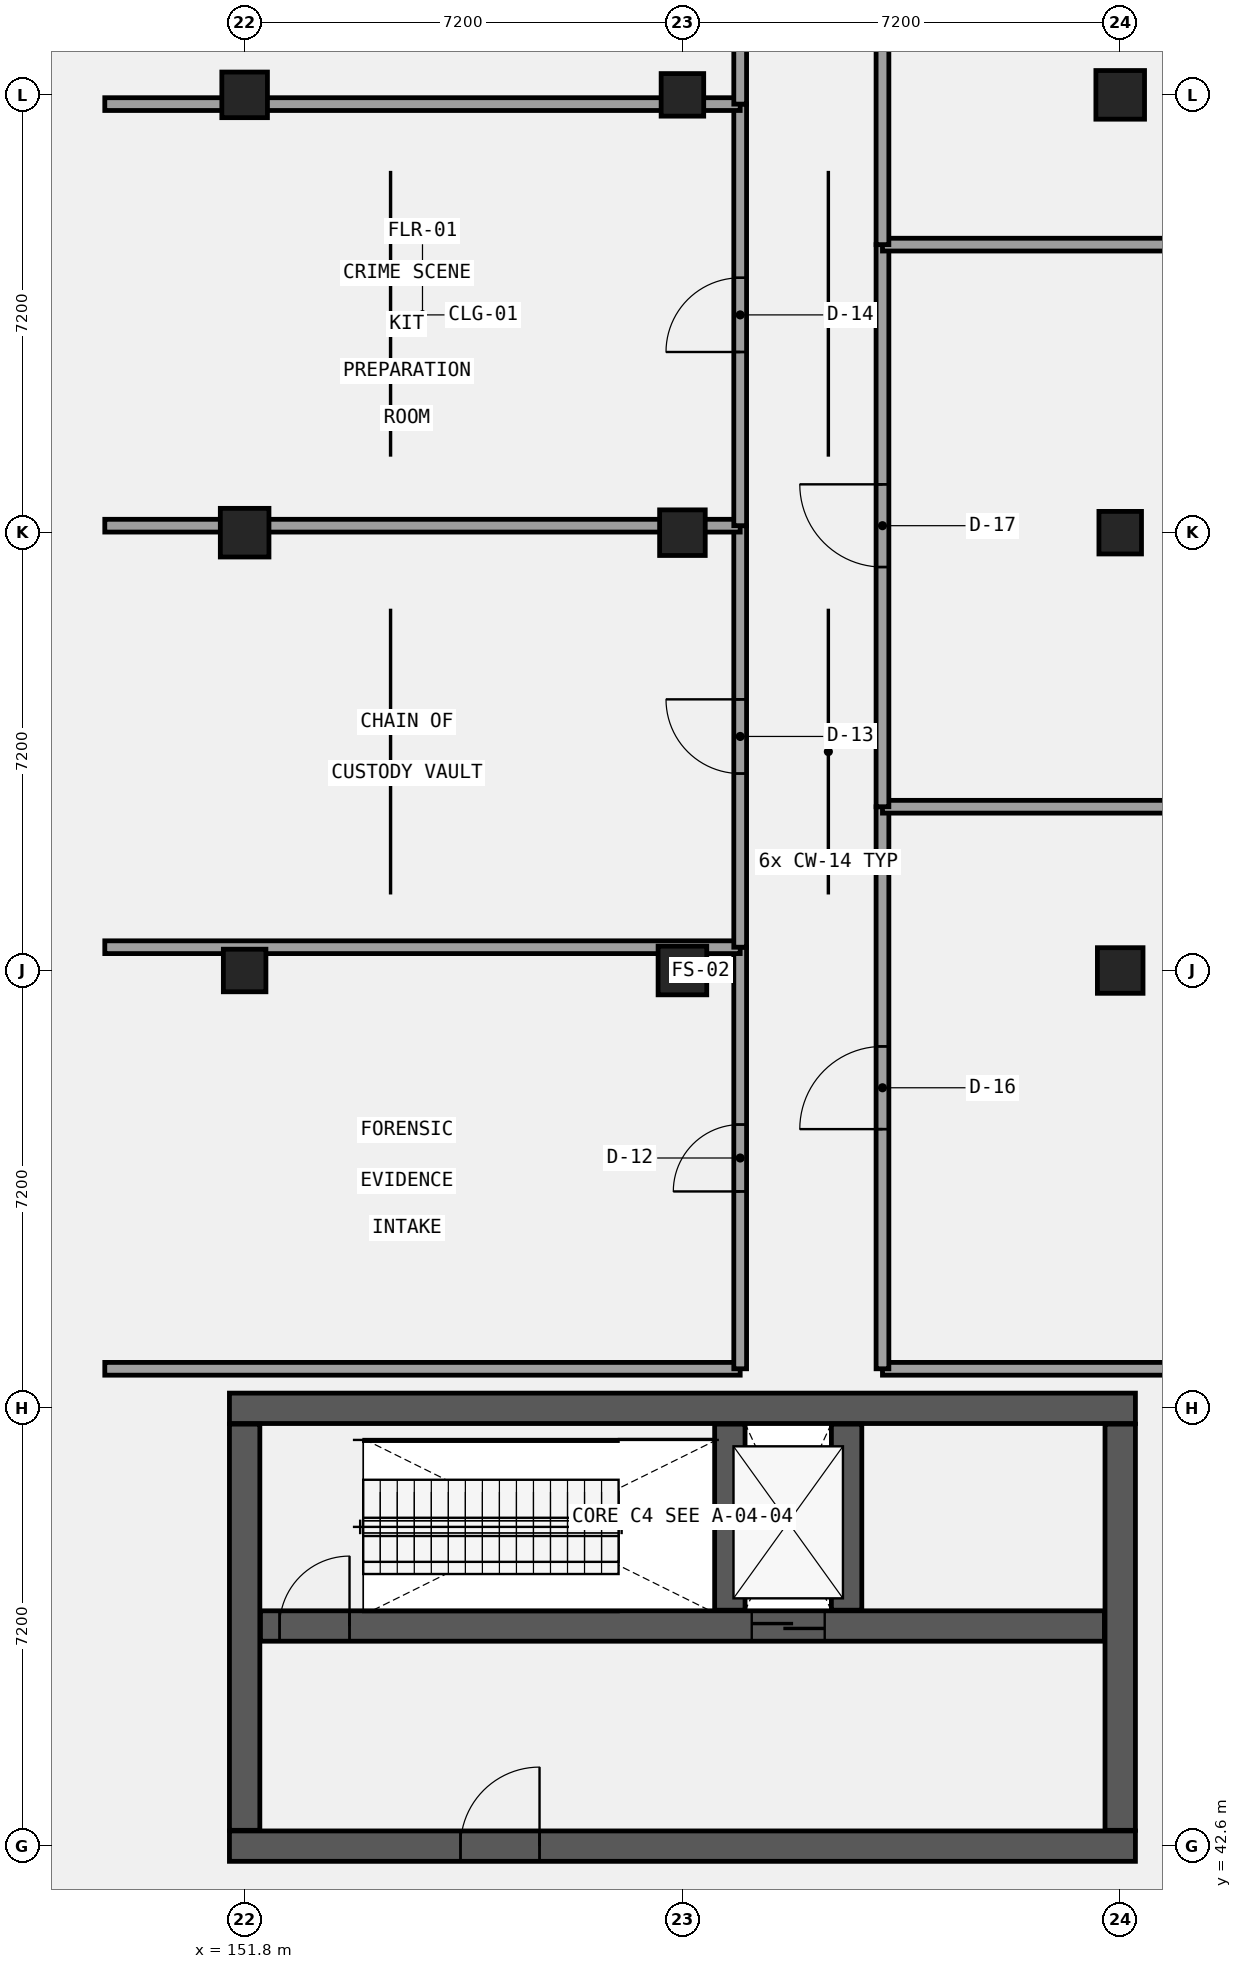
"""IFC4 building model, lengths in metres.
Left out: names, types, materials, properties, quantities, classifications, styles, units other than length and angle.
Written with IfcOpenShell. Run it as: python <this file> out.ifc"""

import sys

from ifc_helpers import new_model, si_unit, direction, frame, frame_2d, origin, origin_2d, place, context, subcontext, project, spatial, rectangle, extrude, element, fill, save


model = new_model("IFC4")
c1 = context("Model", 3, precision=1e-05, world=origin(), true_north=direction((0.0, 1.0)))
c2 = subcontext(c1, "Body", "Model", "MODEL_VIEW")
j1 = project(units=[si_unit("LENGTHUNIT", "METRE"), si_unit("PLANEANGLEUNIT", "RADIAN")], contexts=[c1])
p1 = place(None, origin())
s1 = spatial("IfcSite", under=j1, at=p1, CompositionType="ELEMENT")
p2 = place(p1, origin())
s2 = spatial("IfcBuilding", under=s1, at=p2, CompositionType="ELEMENT")
p3 = place(p2, origin())
s3 = spatial("IfcBuildingStorey", under=s2, at=p3, CompositionType="ELEMENT", Elevation=0.0)
p4 = place(p3, frame((151.55, 49.8, 0.0), z_axis=(0.0, 0.0, 1.0), x_axis=(1.0, 0.0, 0.0)))
e1 = element("IfcWall", 1, at=p4, inside=s3, PredefinedType="SHEAR", context=c2, shape_type="SweptSolid", body=[
    extrude(rectangle(XDim=14.9, YDim=0.5, at=frame_2d((7.45, 0.0))), origin(), (0.0, 0.0, 1.0), 5.4),
])
p5 = place(p3, frame((151.55, 42.6, 0.0), z_axis=(0.0, 0.0, 1.0), x_axis=(1.0, 0.0, 0.0)))
e2 = element("IfcWall", 2, at=p5, inside=s3, PredefinedType="SHEAR", context=c2, shape_type="SweptSolid", body=[
    extrude(rectangle(XDim=14.9, YDim=0.5, at=frame_2d((7.45, 0.0))), origin(), (0.0, 0.0, 1.0), 5.4),
])
p6 = place(p5, frame((3.8, 0.0, 0.0)))
e3 = element("IfcOpeningElement", 3, at=p6, cuts=e2, PredefinedType="OPENING", context=c2, shape_type="SweptSolid", body=[
    extrude(rectangle(XDim=1.3, YDim=2.2, at=frame_2d((0.65, 1.1))), frame((0.0, 0.26, 0.0), z_axis=(0.0, -1.0, 0.0), x_axis=(1.0, 0.0, 0.0)), (0.0, 0.0, 1.0), 0.52),
])
for number, where, z_axis, x_axis in (
    (4, (151.8, 42.86, 0.0), (0.0, 0.0, 1.0), (0.0, 1.0, 0.0)),
    (5, (166.2, 42.86, 0.0), (0.0, 0.0, 1.0), (0.0, 1.0, 0.0)),
):
    element("IfcWall", number, at=place(p3, frame(where, z_axis=z_axis, x_axis=x_axis)), inside=s3, PredefinedType="SHEAR", context=c2, shape_type="SweptSolid", body=[
        extrude(rectangle(XDim=6.68, YDim=0.5, at=frame_2d((3.34, 0.0))), origin(), (0.0, 0.0, 1.0), 5.4),
    ])
p7 = place(p3, frame((152.06, 46.22, 0.0), z_axis=(0.0, 0.0, 1.0), x_axis=(1.0, 0.0, 0.0)))
e6 = element("IfcWall", 6, at=p7, inside=s3, PredefinedType="SHEAR", context=c2, shape_type="SweptSolid", body=[
    extrude(rectangle(XDim=13.88, YDim=0.5, at=frame_2d((6.94, 0.0))), origin(), (0.0, 0.0, 1.0), 5.4),
])
p8 = place(p7, frame((8.08, 0.0, 0.0)))
e7 = element("IfcOpeningElement", 7, at=p8, cuts=e6, PredefinedType="OPENING", context=c2, shape_type="SweptSolid", body=[
    extrude(rectangle(XDim=1.2, YDim=2.15, at=frame_2d((0.6, 1.075))), frame((0.0, 0.26, 0.0), z_axis=(0.0, -1.0, 0.0), x_axis=(1.0, 0.0, 0.0)), (0.0, 0.0, 1.0), 0.52),
])
p9 = place(p7, frame((0.315, 0.0, 0.0)))
e8 = element("IfcOpeningElement", 8, at=p9, cuts=e6, PredefinedType="OPENING", context=c2, shape_type="SweptSolid", body=[
    extrude(rectangle(XDim=1.15, YDim=2.15, at=frame_2d((0.575, 1.075))), frame((0.0, 0.26, 0.0), z_axis=(0.0, -1.0, 0.0), x_axis=(1.0, 0.0, 0.0)), (0.0, 0.0, 1.0), 0.52),
])
for number, where, z_axis, x_axis in (
    (9, (159.78, 46.48, 0.0), (0.0, 0.0, 1.0), (0.0, 1.0, 0.0)),
    (10, (161.7, 46.48, 0.0), (0.0, 0.0, 1.0), (0.0, 1.0, 0.0)),
):
    element("IfcWall", number, at=place(p3, frame(where, z_axis=z_axis, x_axis=x_axis)), inside=s3, PredefinedType="SHEAR", context=c2, shape_type="SweptSolid", body=[
        extrude(rectangle(XDim=3.06, YDim=0.5, at=frame_2d((1.53, 0.0))), origin(), (0.0, 0.0, 1.0), 5.4),
    ])
p10 = place(p3, frame((151.8, 57.0, 0.0), z_axis=(0.0, 0.0, 1.0), x_axis=(1.0, 0.0, 0.0)))
e11 = element("IfcColumn", 11, at=p10, inside=s3, PredefinedType="COLUMN", context=c2, shape_type="SweptSolid", body=[
    extrude(rectangle(XDim=0.7, YDim=0.7, at=origin_2d()), origin(), (0.0, 0.0, 1.0), 5.4),
])
p11 = place(p3, frame((151.8, 64.2, 0.0), z_axis=(0.0, 0.0, 1.0), x_axis=(1.0, 0.0, 0.0)))
e12 = element("IfcColumn", 12, at=p11, inside=s3, PredefinedType="COLUMN", context=c2, shape_type="SweptSolid", body=[
    extrude(rectangle(XDim=0.8, YDim=0.8, at=origin_2d()), origin(), (0.0, 0.0, 1.0), 5.4),
])
p12 = place(p3, frame((151.8, 71.4, 0.0), z_axis=(0.0, 0.0, 1.0), x_axis=(1.0, 0.0, 0.0)))
e13 = element("IfcColumn", 13, at=p12, inside=s3, PredefinedType="COLUMN", context=c2, shape_type="SweptSolid", body=[
    extrude(rectangle(XDim=0.75, YDim=0.75, at=origin_2d()), origin(), (0.0, 0.0, 1.0), 5.4),
])
p13 = place(p3, frame((159.0, 57.0, 0.0), z_axis=(0.0, 0.0, 1.0), x_axis=(1.0, 0.0, 0.0)))
e14 = element("IfcColumn", 14, at=p13, inside=s3, PredefinedType="COLUMN", context=c2, shape_type="SweptSolid", body=[
    extrude(rectangle(XDim=0.8, YDim=0.8, at=origin_2d()), origin(), (0.0, 0.0, 1.0), 5.4),
])
p14 = place(p3, frame((159.0, 64.2, 0.0), z_axis=(0.0, 0.0, 1.0), x_axis=(1.0, 0.0, 0.0)))
e15 = element("IfcColumn", 15, at=p14, inside=s3, PredefinedType="COLUMN", context=c2, shape_type="SweptSolid", body=[
    extrude(rectangle(XDim=0.75, YDim=0.75, at=origin_2d()), origin(), (0.0, 0.0, 1.0), 5.4),
])
p15 = place(p3, frame((159.0, 71.4, 0.0), z_axis=(0.0, 0.0, 1.0), x_axis=(1.0, 0.0, 0.0)))
e16 = element("IfcColumn", 16, at=p15, inside=s3, PredefinedType="COLUMN", context=c2, shape_type="SweptSolid", body=[
    extrude(rectangle(XDim=0.7, YDim=0.7, at=origin_2d()), origin(), (0.0, 0.0, 1.0), 5.4),
])
p16 = place(p3, frame((166.2, 57.0, 0.0), z_axis=(0.0, 0.0, 1.0), x_axis=(1.0, 0.0, 0.0)))
e17 = element("IfcColumn", 17, at=p16, inside=s3, PredefinedType="COLUMN", context=c2, shape_type="SweptSolid", body=[
    extrude(rectangle(XDim=0.75, YDim=0.75, at=origin_2d()), origin(), (0.0, 0.0, 1.0), 5.4),
])
p17 = place(p3, frame((166.2, 64.2, 0.0), z_axis=(0.0, 0.0, 1.0), x_axis=(1.0, 0.0, 0.0)))
e18 = element("IfcColumn", 18, at=p17, inside=s3, PredefinedType="COLUMN", context=c2, shape_type="SweptSolid", body=[
    extrude(rectangle(XDim=0.7, YDim=0.7, at=origin_2d()), origin(), (0.0, 0.0, 1.0), 5.4),
])
p18 = place(p3, frame((166.2, 71.4, 0.0), z_axis=(0.0, 0.0, 1.0), x_axis=(1.0, 0.0, 0.0)))
e19 = element("IfcColumn", 19, at=p18, inside=s3, PredefinedType="COLUMN", context=c2, shape_type="SweptSolid", body=[
    extrude(rectangle(XDim=0.8, YDim=0.8, at=origin_2d()), origin(), (0.0, 0.0, 1.0), 5.4),
])
p19 = place(p3, frame((149.5, 50.45, 0.0), z_axis=(0.0, 0.0, 1.0), x_axis=(1.0, 0.0, 0.0)))
e20 = element("IfcWall", 20, at=p19, inside=s3, PredefinedType="PARTITIONING", context=c2, shape_type="SweptSolid", body=[
    extrude(rectangle(XDim=10.45, YDim=0.21, at=frame_2d((5.225, 0.0))), origin(), (0.0, 0.0, 1.0), 5.12),
])
p20 = place(p3, frame((159.95, 50.45, 0.0), z_axis=(0.0, 0.0, 1.0), x_axis=(0.0, 1.0, 0.0)))
e21 = element("IfcWall", 21, at=p20, inside=s3, PredefinedType="PARTITIONING", context=c2, shape_type="SweptSolid", body=[
    extrude(rectangle(XDim=6.933, YDim=0.21, at=frame_2d((3.467, 0.0))), origin(), (0.0, 0.0, 1.0), 5.12),
])
p21 = place(p20, frame((2.917, 0.0, 0.0)))
e22 = element("IfcOpeningElement", 22, at=p21, cuts=e21, PredefinedType="OPENING", context=c2, shape_type="SweptSolid", body=[
    extrude(rectangle(XDim=1.1, YDim=2.35, at=frame_2d((0.55, 1.175))), frame((0.0, 0.115, 0.0), z_axis=(0.0, -1.0, 0.0), x_axis=(1.0, 0.0, 0.0)), (0.0, 0.0, 1.0), 0.23),
])
p22 = place(p3, frame((149.5, 57.383, 0.0), z_axis=(0.0, 0.0, 1.0), x_axis=(1.0, 0.0, 0.0)))
e23 = element("IfcWall", 23, at=p22, inside=s3, PredefinedType="PARTITIONING", context=c2, shape_type="SweptSolid", body=[
    extrude(rectangle(XDim=10.45, YDim=0.21, at=frame_2d((5.225, 0.0))), origin(), (0.0, 0.0, 1.0), 5.12),
])
p23 = place(p3, frame((159.95, 57.383, 0.0), z_axis=(0.0, 0.0, 1.0), x_axis=(0.0, 1.0, 0.0)))
e24 = element("IfcWall", 24, at=p23, inside=s3, PredefinedType="PARTITIONING", context=c2, shape_type="SweptSolid", body=[
    extrude(rectangle(XDim=6.932, YDim=0.21, at=frame_2d((3.466, 0.0))), origin(), (0.0, 0.0, 1.0), 5.12),
])
p24 = place(p23, frame((2.856, 0.0, 0.0)))
e25 = element("IfcOpeningElement", 25, at=p24, cuts=e24, PredefinedType="OPENING", context=c2, shape_type="SweptSolid", body=[
    extrude(rectangle(XDim=1.22, YDim=2.1, at=frame_2d((0.61, 1.05))), frame((0.0, 0.115, 0.0), z_axis=(0.0, -1.0, 0.0), x_axis=(1.0, 0.0, 0.0)), (0.0, 0.0, 1.0), 0.23),
])
p25 = place(p3, frame((149.5, 64.315, 0.0), z_axis=(0.0, 0.0, 1.0), x_axis=(1.0, 0.0, 0.0)))
e26 = element("IfcWall", 26, at=p25, inside=s3, PredefinedType="PARTITIONING", context=c2, shape_type="SweptSolid", body=[
    extrude(rectangle(XDim=10.45, YDim=0.21, at=frame_2d((5.225, 0.0))), origin(), (0.0, 0.0, 1.0), 4.27),
])
p26 = place(p3, frame((159.95, 64.315, 0.0), z_axis=(0.0, 0.0, 1.0), x_axis=(0.0, 1.0, 0.0)))
e27 = element("IfcWall", 27, at=p26, inside=s3, PredefinedType="PARTITIONING", context=c2, shape_type="SweptSolid", body=[
    extrude(rectangle(XDim=6.933, YDim=0.21, at=frame_2d((3.467, 0.0))), origin(), (0.0, 0.0, 1.0), 5.12),
])
p27 = place(p26, frame((2.856, 0.0, 0.0)))
e28 = element("IfcOpeningElement", 28, at=p27, cuts=e27, PredefinedType="OPENING", context=c2, shape_type="SweptSolid", body=[
    extrude(rectangle(XDim=1.22, YDim=2.22, at=frame_2d((0.61, 1.11))), frame((0.0, 0.115, 0.0), z_axis=(0.0, -1.0, 0.0), x_axis=(1.0, 0.0, 0.0)), (0.0, 0.0, 1.0), 0.23),
])
p28 = place(p3, frame((149.5, 71.248, 0.0), z_axis=(0.0, 0.0, 1.0), x_axis=(1.0, 0.0, 0.0)))
e29 = element("IfcWall", 29, at=p28, inside=s3, PredefinedType="PARTITIONING", context=c2, shape_type="SweptSolid", body=[
    extrude(rectangle(XDim=10.45, YDim=0.21, at=frame_2d((5.225, 0.0))), origin(), (0.0, 0.0, 1.0), 4.22),
])
p29 = place(p3, frame((159.95, 71.248, 0.0), z_axis=(0.0, 0.0, 1.0), x_axis=(0.0, 1.0, 0.0)))
e30 = element("IfcWall", 30, at=p29, inside=s3, PredefinedType="PARTITIONING", context=c2, shape_type="SweptSolid", body=[
    extrude(rectangle(XDim=6.932, YDim=0.21, at=frame_2d((3.466, 0.0))), origin(), (0.0, 0.0, 1.0), 5.12),
])
p30 = place(p29, frame((2.856, 0.0, 0.0)))
e31 = element("IfcOpeningElement", 31, at=p30, cuts=e30, PredefinedType="OPENING", context=c2, shape_type="SweptSolid", body=[
    extrude(rectangle(XDim=1.22, YDim=2.35, at=frame_2d((0.61, 1.175))), frame((0.0, 0.115, 0.0), z_axis=(0.0, -1.0, 0.0), x_axis=(1.0, 0.0, 0.0)), (0.0, 0.0, 1.0), 0.23),
])
p31 = place(p3, frame((162.29, 50.45, 0.0), z_axis=(0.0, 0.0, 1.0), x_axis=(1.0, 0.0, 0.0)))
e32 = element("IfcWall", 32, at=p31, inside=s3, PredefinedType="PARTITIONING", context=c2, shape_type="SweptSolid", body=[
    extrude(rectangle(XDim=11.53, YDim=0.21, at=frame_2d((5.765, 0.0))), origin(), (0.0, 0.0, 1.0), 5.12),
])
p32 = place(p3, frame((162.29, 50.45, 0.0), z_axis=(0.0, 0.0, 1.0), x_axis=(0.0, 1.0, 0.0)))
e33 = element("IfcWall", 33, at=p32, inside=s3, PredefinedType="PARTITIONING", context=c2, shape_type="SweptSolid", body=[
    extrude(rectangle(XDim=9.243, YDim=0.21, at=frame_2d((4.622, 0.0))), origin(), (0.0, 0.0, 1.0), 5.12),
])
p33 = place(p32, frame((3.941, 0.0, 0.0)))
e34 = element("IfcOpeningElement", 34, at=p33, cuts=e33, PredefinedType="OPENING", context=c2, shape_type="SweptSolid", body=[
    extrude(rectangle(XDim=1.36, YDim=2.1, at=frame_2d((0.68, 1.05))), frame((0.0, 0.115, 0.0), z_axis=(0.0, -1.0, 0.0), x_axis=(1.0, 0.0, 0.0)), (0.0, 0.0, 1.0), 0.23),
])
p34 = place(p3, frame((162.29, 59.693, 0.0), z_axis=(0.0, 0.0, 1.0), x_axis=(1.0, 0.0, 0.0)))
e35 = element("IfcWall", 35, at=p34, inside=s3, PredefinedType="PARTITIONING", context=c2, shape_type="SweptSolid", body=[
    extrude(rectangle(XDim=11.53, YDim=0.21, at=frame_2d((5.765, 0.0))), origin(), (0.0, 0.0, 1.0), 5.12),
])
p35 = place(p3, frame((162.29, 59.693, 0.0), z_axis=(0.0, 0.0, 1.0), x_axis=(0.0, 1.0, 0.0)))
e36 = element("IfcWall", 36, at=p35, inside=s3, PredefinedType="PARTITIONING", context=c2, shape_type="SweptSolid", body=[
    extrude(rectangle(XDim=9.244, YDim=0.21, at=frame_2d((4.622, 0.0))), origin(), (0.0, 0.0, 1.0), 5.12),
])
p36 = place(p35, frame((3.942, 0.0, 0.0)))
e37 = element("IfcOpeningElement", 37, at=p36, cuts=e36, PredefinedType="OPENING", context=c2, shape_type="SweptSolid", body=[
    extrude(rectangle(XDim=1.36, YDim=2.22, at=frame_2d((0.68, 1.11))), frame((0.0, 0.115, 0.0), z_axis=(0.0, -1.0, 0.0), x_axis=(1.0, 0.0, 0.0)), (0.0, 0.0, 1.0), 0.23),
])
p37 = place(p3, frame((162.29, 68.937, 0.0), z_axis=(0.0, 0.0, 1.0), x_axis=(1.0, 0.0, 0.0)))
e38 = element("IfcWall", 38, at=p37, inside=s3, PredefinedType="PARTITIONING", context=c2, shape_type="SweptSolid", body=[
    extrude(rectangle(XDim=11.53, YDim=0.21, at=frame_2d((5.765, 0.0))), origin(), (0.0, 0.0, 1.0), 5.12),
])
p38 = place(p3, frame((162.29, 68.937, 0.0), z_axis=(0.0, 0.0, 1.0), x_axis=(0.0, 1.0, 0.0)))
e39 = element("IfcWall", 39, at=p38, inside=s3, PredefinedType="PARTITIONING", context=c2, shape_type="SweptSolid", body=[
    extrude(rectangle(XDim=9.243, YDim=0.21, at=frame_2d((4.622, 0.0))), origin(), (0.0, 0.0, 1.0), 5.12),
])
p39 = place(p38, frame((3.941, 0.0, 0.0)))
e40 = element("IfcOpeningElement", 40, at=p39, cuts=e39, PredefinedType="OPENING", context=c2, shape_type="SweptSolid", body=[
    extrude(rectangle(XDim=1.36, YDim=2.35, at=frame_2d((0.68, 1.175))), frame((0.0, 0.115, 0.0), z_axis=(0.0, -1.0, 0.0), x_axis=(1.0, 0.0, 0.0)), (0.0, 0.0, 1.0), 0.23),
])
p40 = place(p8, frame((1.2, 0.0, 0.0), z_axis=(0.0, 0.0, 1.0), x_axis=(-1.0, 0.0, 0.0)))
e41 = element("IfcDoor", 41, at=p40, inside=s3, OperationType="DOUBLE_DOOR_SLIDING", PredefinedType="DOOR", context=c2, shape_type="SweptSolid", body=[
    extrude(rectangle(XDim=1.2, YDim=2.15, at=frame_2d((0.6, 1.075))), frame((0.0, 0.025, 0.0), z_axis=(0.0, -1.0, 0.0), x_axis=(1.0, 0.0, 0.0)), (0.0, 0.0, 1.0), 0.05),
])
fill(e7, e41)
p41 = place(p9, origin())
e42 = element("IfcDoor", 42, at=p41, inside=s3, OperationType="SINGLE_SWING_RIGHT", PredefinedType="DOOR", context=c2, shape_type="SweptSolid", body=[
    extrude(rectangle(XDim=1.15, YDim=2.15, at=frame_2d((0.575, 1.075))), frame((0.0, 0.025, 0.0), z_axis=(0.0, -1.0, 0.0), x_axis=(1.0, 0.0, 0.0)), (0.0, 0.0, 1.0), 0.05),
])
fill(e8, e42)
p42 = place(p6, frame((1.3, 0.0, 0.0), z_axis=(0.0, 0.0, 1.0), x_axis=(-1.0, 0.0, 0.0)))
e43 = element("IfcDoor", 43, at=p42, inside=s3, OperationType="SINGLE_SWING_RIGHT", PredefinedType="DOOR", context=c2, shape_type="SweptSolid", body=[
    extrude(rectangle(XDim=1.3, YDim=2.2, at=frame_2d((0.65, 1.1))), frame((0.0, 0.025, 0.0), z_axis=(0.0, -1.0, 0.0), x_axis=(1.0, 0.0, 0.0)), (0.0, 0.0, 1.0), 0.05),
])
fill(e3, e43)
p43 = place(p21, frame((1.1, 0.0, 0.0), z_axis=(0.0, 0.0, 1.0), x_axis=(-1.0, 0.0, 0.0)))
e44 = element("IfcDoor", 44, at=p43, inside=s3, OperationType="SINGLE_SWING_LEFT", PredefinedType="DOOR", context=c2, shape_type="SweptSolid", body=[
    extrude(rectangle(XDim=1.1, YDim=2.35, at=frame_2d((0.55, 1.175))), frame((0.0, 0.025, 0.0), z_axis=(0.0, -1.0, 0.0), x_axis=(1.0, 0.0, 0.0)), (0.0, 0.0, 1.0), 0.05),
])
fill(e22, e44)
p44 = place(p24, frame((1.22, 0.0, 0.0), z_axis=(0.0, 0.0, 1.0), x_axis=(-1.0, 0.0, 0.0)))
e45 = element("IfcDoor", 45, at=p44, inside=s3, OperationType="SINGLE_SWING_RIGHT", PredefinedType="DOOR", context=c2, shape_type="SweptSolid", body=[
    extrude(rectangle(XDim=1.22, YDim=2.1, at=frame_2d((0.61, 1.05))), frame((0.0, 0.025, 0.0), z_axis=(0.0, -1.0, 0.0), x_axis=(1.0, 0.0, 0.0)), (0.0, 0.0, 1.0), 0.05),
])
fill(e25, e45)
p45 = place(p27, frame((1.22, 0.0, 0.0), z_axis=(0.0, 0.0, 1.0), x_axis=(-1.0, 0.0, 0.0)))
e46 = element("IfcDoor", 46, at=p45, inside=s3, OperationType="SINGLE_SWING_LEFT", PredefinedType="DOOR", context=c2, shape_type="SweptSolid", body=[
    extrude(rectangle(XDim=1.22, YDim=2.22, at=frame_2d((0.61, 1.11))), frame((0.0, 0.025, 0.0), z_axis=(0.0, -1.0, 0.0), x_axis=(1.0, 0.0, 0.0)), (0.0, 0.0, 1.0), 0.05),
])
fill(e28, e46)
p46 = place(p33, origin())
e47 = element("IfcDoor", 47, at=p46, inside=s3, OperationType="SINGLE_SWING_LEFT", PredefinedType="DOOR", context=c2, shape_type="SweptSolid", body=[
    extrude(rectangle(XDim=1.36, YDim=2.1, at=frame_2d((0.68, 1.05))), frame((0.0, 0.025, 0.0), z_axis=(0.0, -1.0, 0.0), x_axis=(1.0, 0.0, 0.0)), (0.0, 0.0, 1.0), 0.05),
])
fill(e34, e47)
p47 = place(p36, origin())
e48 = element("IfcDoor", 48, at=p47, inside=s3, OperationType="SINGLE_SWING_RIGHT", PredefinedType="DOOR", context=c2, shape_type="SweptSolid", body=[
    extrude(rectangle(XDim=1.36, YDim=2.22, at=frame_2d((0.68, 1.11))), frame((0.0, 0.025, 0.0), z_axis=(0.0, -1.0, 0.0), x_axis=(1.0, 0.0, 0.0)), (0.0, 0.0, 1.0), 0.05),
])
fill(e37, e48)
save(model, sys.argv[1])
